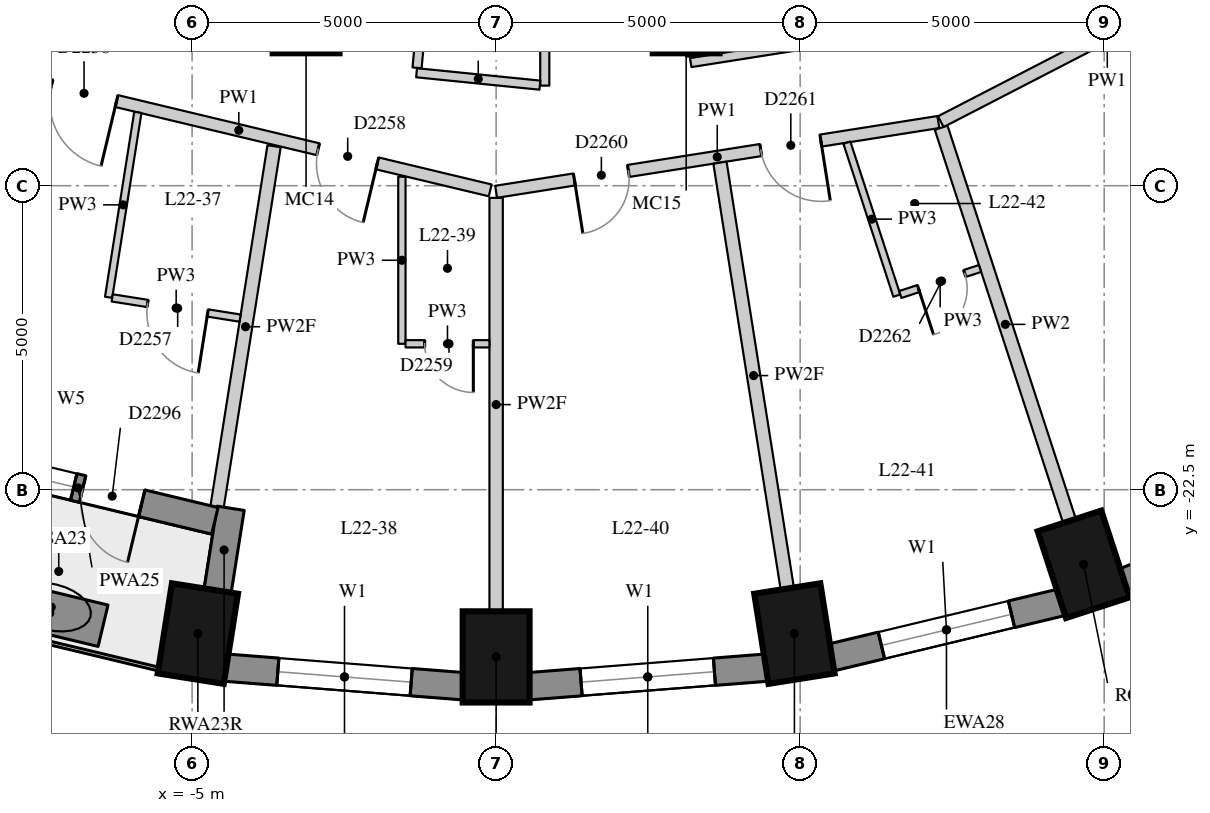
"""IFC4 building model, lengths in metres.
Left out: names, types, materials, properties, quantities, classifications, styles, units other than length and angle.
Written with IfcOpenShell. Run it as: python <this file> out.ifc"""

import sys

from ifc_helpers import new_model, si_unit, direction, frame, frame_2d, origin, origin_2d, place, context, subcontext, project, spatial, rectangle, extrude, element, fill, save


model = new_model("IFC4")
c1 = context("Model", 3, precision=1e-05, world=origin(), true_north=direction((0.0, 1.0)))
c2 = subcontext(c1, "Body", "Model", "MODEL_VIEW")
j1 = project(units=[si_unit("LENGTHUNIT", "METRE"), si_unit("PLANEANGLEUNIT", "RADIAN")], contexts=[c1])
p1 = place(None, origin())
s1 = spatial("IfcSite", under=j1, at=p1, CompositionType="ELEMENT")
p2 = place(p1, origin())
s2 = spatial("IfcBuilding", under=s1, at=p2, CompositionType="ELEMENT")
p3 = place(p2, frame((0.0, 0.0, 81.1)))
s3 = spatial("IfcBuildingStorey", under=s2, at=p3, CompositionType="ELEMENT", Elevation=81.1)
for number, where, z_axis, x_axis in (
    (1, (-4.906, -24.866, 0.0), (0.0, 0.0, 1.0), (-0.156, -0.988, 0.0)),
    (2, (0.0, -25.25, 0.0), (0.0, 0.0, 1.0), (0.0, -1.0, 0.0)),
    (3, (4.906, -24.866, 0.0), (0.0, 0.0, 1.0), (0.156, -0.988, 0.0)),
    (4, (9.662, -23.727, 0.0), (0.0, 0.0, 1.0), (0.31, -0.951, 0.0)),
):
    element("IfcColumn", number, at=place(p3, frame(where, z_axis=z_axis, x_axis=x_axis)), inside=s3, PredefinedType="COLUMN", context=c2, shape_type="SweptSolid", body=[
        extrude(rectangle(XDim=1.5, YDim=1.1, at=origin_2d()), origin(), (0.0, 0.0, 1.0), 3.3),
    ])
for number, where, z_axis, x_axis in (
    (5, (-3.126, -14.772, 0.0), (0.0, 0.0, 1.0), (1.0, 0.0, 0.0)),
    (6, (3.126, -14.772, 0.0), (0.0, 0.0, 1.0), (1.0, 0.0, 0.0)),
):
    element("IfcColumn", number, at=place(p3, frame(where, z_axis=z_axis, x_axis=x_axis)), inside=s3, PredefinedType="COLUMN", context=c2, shape_type="SweptSolid", body=[
        extrude(rectangle(XDim=1.1, YDim=1.1, at=origin_2d()), origin(), (0.0, 0.0, 1.0), 3.3),
    ])
p4 = place(p3, frame((-4.457, -25.426, 0.0), z_axis=(0.0, 0.0, 1.0), x_axis=(0.996955972145, -0.077966592873, 0.0)))
e7 = element("IfcWall", 7, at=p4, inside=s3, PredefinedType="SOLIDWALL", context=c2, shape_type="SweptSolid", body=[
    extrude(rectangle(XDim=3.939, YDim=0.45, at=frame_2d((1.97, 0.0))), origin(), (0.0, 0.0, 1.0), 2.85),
])
p5 = place(p4, frame((0.87, 0.0, 0.4)))
e8 = element("IfcOpeningElement", 8, at=p5, cuts=e7, PredefinedType="OPENING", context=c2, shape_type="SweptSolid", body=[
    extrude(rectangle(XDim=2.2, YDim=1.75, at=frame_2d((1.1, 0.875))), frame((0.0, 0.235, 0.0), z_axis=(0.0, -1.0, 0.0), x_axis=(1.0, 0.0, 0.0)), (0.0, 0.0, 1.0), 0.47),
])
p6 = place(p3, frame((0.53, -25.733, 0.0), z_axis=(0.0, 0.0, 1.0), x_axis=(0.996955972145, 0.077966592873, 0.0)))
e9 = element("IfcWall", 9, at=p6, inside=s3, PredefinedType="SOLIDWALL", context=c2, shape_type="SweptSolid", body=[
    extrude(rectangle(XDim=3.939, YDim=0.45, at=frame_2d((1.97, 0.0))), origin(), (0.0, 0.0, 1.0), 2.85),
])
p7 = place(p6, frame((0.87, 0.0, 0.4)))
e10 = element("IfcOpeningElement", 10, at=p7, cuts=e9, PredefinedType="OPENING", context=c2, shape_type="SweptSolid", body=[
    extrude(rectangle(XDim=2.2, YDim=1.75, at=frame_2d((1.1, 0.875))), frame((0.0, 0.235, 0.0), z_axis=(0.0, -1.0, 0.0), x_axis=(1.0, 0.0, 0.0)), (0.0, 0.0, 1.0), 0.47),
])
p8 = place(p3, frame((5.504, -25.26, 0.0), z_axis=(0.0, 0.0, 1.0), x_axis=(0.972496561493, 0.232917233979, 0.0)))
e11 = element("IfcWall", 11, at=p8, inside=s3, PredefinedType="SOLIDWALL", context=c2, shape_type="SweptSolid", body=[
    extrude(rectangle(XDim=3.911, YDim=0.45, at=frame_2d((1.956, 0.0))), origin(), (0.0, 0.0, 1.0), 2.85),
])
p9 = place(p8, frame((0.855, 0.0, 0.4)))
e12 = element("IfcOpeningElement", 12, at=p9, cuts=e11, PredefinedType="OPENING", context=c2, shape_type="SweptSolid", body=[
    extrude(rectangle(XDim=2.2, YDim=1.75, at=frame_2d((1.1, 0.875))), frame((0.0, 0.235, 0.0), z_axis=(0.0, -1.0, 0.0), x_axis=(1.0, 0.0, 0.0)), (0.0, 0.0, 1.0), 0.47),
])
p10 = place(p3, frame((10.315, -24.021, 0.0), z_axis=(0.0, 0.0, 1.0), x_axis=(0.923031964282, 0.384723267966, 0.0)))
e13 = element("IfcWall", 13, at=p10, inside=s3, PredefinedType="SOLIDWALL", context=c2, shape_type="SweptSolid", body=[
    extrude(rectangle(XDim=3.856, YDim=0.45, at=frame_2d((1.928, 0.0))), origin(), (0.0, 0.0, 1.0), 2.85),
])
p11 = place(p10, frame((0.828, 0.0, 0.4)))
e14 = element("IfcOpeningElement", 14, at=p11, cuts=e13, PredefinedType="OPENING", context=c2, shape_type="SweptSolid", body=[
    extrude(rectangle(XDim=2.2, YDim=1.75, at=frame_2d((1.1, 0.875))), frame((0.0, 0.235, 0.0), z_axis=(0.0, -1.0, 0.0), x_axis=(1.0, 0.0, 0.0)), (0.0, 0.0, 1.0), 0.47),
])
p12 = place(p3, frame((-4.583, -24.178, 0.0), z_axis=(0.0, 0.0, 1.0), x_axis=(0.156133927791, 0.98773589415, 0.0)))
e15 = element("IfcWall", 15, at=p12, inside=s3, PredefinedType="SOLIDWALL", context=c2, shape_type="SweptSolid", body=[
    extrude(rectangle(XDim=1.39, YDim=0.45, at=frame_2d((0.695, 0.0))), origin(), (0.0, 0.0, 1.0), 2.3),
])
p13 = place(p3, frame((-9.122, -21.932, 0.0), z_axis=(0.0, 0.0, 1.0), x_axis=(0.972346547441, -0.233542697764, 0.0)))
e16 = element("IfcWall", 16, at=p13, inside=s3, PredefinedType="SOLIDWALL", context=c2, shape_type="SweptSolid", body=[
    extrude(rectangle(XDim=4.624, YDim=0.45, at=frame_2d((2.312, 0.0))), origin(), (0.0, 0.0, 1.0), 2.85),
])
p14 = place(p13, frame((1.237, 0.0, 0.4)))
e17 = element("IfcOpeningElement", 17, at=p14, cuts=e16, PredefinedType="OPENING", context=c2, shape_type="SweptSolid", body=[
    extrude(rectangle(XDim=1.0, YDim=1.75, at=frame_2d((0.5, 0.875))), frame((0.0, 0.235, 0.0), z_axis=(0.0, -1.0, 0.0), x_axis=(1.0, 0.0, 0.0)), (0.0, 0.0, 1.0), 0.47),
])
p15 = place(p13, frame((2.387, 0.0, 0.0)))
e18 = element("IfcOpeningElement", 18, at=p15, cuts=e16, PredefinedType="OPENING", context=c2, shape_type="SweptSolid", body=[
    extrude(rectangle(XDim=1.0, YDim=2.15, at=frame_2d((0.5, 1.075))), frame((0.0, 0.235, 0.0), z_axis=(0.0, -1.0, 0.0), x_axis=(1.0, 0.0, 0.0)), (0.0, 0.0, 1.0), 0.47),
])
p16 = place(p3, frame((-8.215, -24.318, 0.0), z_axis=(0.0, 0.0, 1.0), x_axis=(0.972504142103, -0.232885580473, 0.0)))
e19 = element("IfcWall", 19, at=p16, inside=s3, PredefinedType="USERDEFINED", context=c2, shape_type="SweptSolid", body=[
    extrude(rectangle(XDim=1.8, YDim=0.7, at=frame_2d((0.9, 0.0))), origin(), (0.0, 0.0, 1.0), 0.75),
])
p17 = place(p3, frame((12.79, -13.619, 0.0), z_axis=(0.0, 0.0, 1.0), x_axis=(-0.888545137607, -0.458789209152, 0.0)))
e20 = element("IfcWall", 20, at=p17, inside=s3, PredefinedType="PARTITIONING", context=c2, shape_type="SweptSolid", body=[
    extrude(rectangle(XDim=6.164, YDim=0.2, at=frame_2d((3.082, 0.0))), origin(), (0.0, 0.0, 1.0), 2.85),
])
p18 = place(p17, frame((1.533, 0.0, 0.0)))
e21 = element("IfcOpeningElement", 21, at=p18, cuts=e20, PredefinedType="OPENING", context=c2, shape_type="SweptSolid", body=[
    extrude(rectangle(XDim=1.1, YDim=2.1, at=frame_2d((0.55, 1.05))), frame((0.0, 0.11, 0.0), z_axis=(0.0, -1.0, 0.0), x_axis=(1.0, 0.0, 0.0)), (0.0, 0.0, 1.0), 0.22),
])
p19 = place(p3, frame((7.273, -16.453, 0.0), z_axis=(0.0, 0.0, 1.0), x_axis=(-0.987787686426, -0.155805925901, 0.0)))
e22 = element("IfcWall", 22, at=p19, inside=s3, PredefinedType="PARTITIONING", context=c2, shape_type="SweptSolid", body=[
    extrude(rectangle(XDim=7.363, YDim=0.2, at=frame_2d((3.682, 0.0))), origin(), (0.0, 0.0, 1.0), 2.85),
])
p20 = place(p19, frame((5.161, 0.0, 0.0)))
e23 = element("IfcOpeningElement", 23, at=p20, cuts=e22, PredefinedType="OPENING", context=c2, shape_type="SweptSolid", body=[
    extrude(rectangle(XDim=0.9, YDim=2.1, at=frame_2d((0.45, 1.05))), frame((0.0, 0.11, 0.0), z_axis=(0.0, -1.0, 0.0), x_axis=(1.0, 0.0, 0.0)), (0.0, 0.0, 1.0), 0.22),
])
p21 = place(p19, frame((1.957, 0.0, 0.0)))
e24 = element("IfcOpeningElement", 24, at=p21, cuts=e22, PredefinedType="OPENING", context=c2, shape_type="SweptSolid", body=[
    extrude(rectangle(XDim=1.0, YDim=2.1, at=frame_2d((0.5, 1.05))), frame((0.0, 0.11, 0.0), z_axis=(0.0, -1.0, 0.0), x_axis=(1.0, 0.0, 0.0)), (0.0, 0.0, 1.0), 0.22),
])
p22 = place(p3, frame((-0.098, -17.577, 0.0), z_axis=(0.0, 0.0, 1.0), x_axis=(-0.972591034443, 0.232522428425, 0.0)))
e25 = element("IfcWall", 25, at=p22, inside=s3, PredefinedType="PARTITIONING", context=c2, shape_type="SweptSolid", body=[
    extrude(rectangle(XDim=8.501, YDim=0.2, at=frame_2d((4.251, 0.0))), origin(), (0.0, 0.0, 1.0), 2.85),
])
p23 = place(p22, frame((6.318, 0.0, 0.0)))
e26 = element("IfcOpeningElement", 26, at=p23, cuts=e25, PredefinedType="OPENING", context=c2, shape_type="SweptSolid", body=[
    extrude(rectangle(XDim=1.1, YDim=2.1, at=frame_2d((0.55, 1.05))), frame((0.0, 0.11, 0.0), z_axis=(0.0, -1.0, 0.0), x_axis=(1.0, 0.0, 0.0)), (0.0, 0.0, 1.0), 0.22),
])
p24 = place(p22, frame((1.909, 0.0, 0.0)))
e27 = element("IfcOpeningElement", 27, at=p24, cuts=e25, PredefinedType="OPENING", context=c2, shape_type="SweptSolid", body=[
    extrude(rectangle(XDim=1.0, YDim=2.1, at=frame_2d((0.5, 1.05))), frame((0.0, 0.11, 0.0), z_axis=(0.0, -1.0, 0.0), x_axis=(1.0, 0.0, 0.0)), (0.0, 0.0, 1.0), 0.22),
])
p25 = place(p3, frame((0.8, -9.15, 0.0), z_axis=(0.0, 0.0, 1.0), x_axis=(0.0, -1.0, 0.0)))
e28 = element("IfcWall", 28, at=p25, inside=s3, PredefinedType="PARTITIONING", context=c2, shape_type="SweptSolid", body=[
    extrude(rectangle(XDim=6.704, YDim=0.15, at=frame_2d((3.352, 0.0))), origin(), (0.0, 0.0, 1.0), 2.3),
])
p26 = place(p25, frame((2.902, 0.0, 0.0)))
e29 = element("IfcOpeningElement", 29, at=p26, cuts=e28, PredefinedType="OPENING", context=c2, shape_type="SweptSolid", body=[
    extrude(rectangle(XDim=0.9, YDim=2.1, at=frame_2d((0.45, 1.05))), frame((0.0, 0.085, 0.0), z_axis=(0.0, -1.0, 0.0), x_axis=(1.0, 0.0, 0.0)), (0.0, 0.0, 1.0), 0.17),
])
p27 = place(p3, frame((0.72, -15.846, 0.0), z_axis=(0.0, 0.0, 1.0), x_axis=(-0.994975339981, 0.100120291794, 0.0)))
e30 = element("IfcWall", 30, at=p27, inside=s3, PredefinedType="PARTITIONING", context=c2, shape_type="SweptSolid", body=[
    extrude(rectangle(XDim=2.039, YDim=0.15, at=frame_2d((1.019, 0.0))), origin(), (0.0, 0.0, 1.0), 2.85),
])
p28 = place(p3, frame((-1.301, -15.562, 0.0), z_axis=(0.0, 0.0, 1.0), x_axis=(0.092711214224, 0.995693040428, 0.0)))
e31 = element("IfcWall", 31, at=p28, inside=s3, PredefinedType="PARTITIONING", context=c2, shape_type="SweptSolid", body=[
    extrude(rectangle(XDim=1.346, YDim=0.15, at=frame_2d((0.673, 0.0))), origin(), (0.0, 0.0, 1.0), 2.3),
])
p29 = place(p3, frame((6.788, -14.909, 0.0), z_axis=(0.0, 0.0, 1.0), x_axis=(-0.987791284458, -0.15578311317, 0.0)))
e32 = element("IfcWall", 32, at=p29, inside=s3, PredefinedType="PARTITIONING", context=c2, shape_type="SweptSolid", body=[
    extrude(rectangle(XDim=3.633, YDim=0.15, at=frame_2d((1.816, 0.0))), origin(), (0.0, 0.0, 1.0), 2.85),
])
p30 = place(p3, frame((3.2, -15.375, 0.0), z_axis=(0.0, 0.0, 1.0), x_axis=(0.0, 1.0, 0.0)))
e33 = element("IfcWall", 33, at=p30, inside=s3, PredefinedType="PARTITIONING", context=c2, shape_type="SweptSolid", body=[
    extrude(rectangle(XDim=3.375, YDim=0.15, at=frame_2d((1.688, 0.0))), origin(), (0.0, 0.0, 1.0), 2.85),
])
p31 = place(p3, frame((-4.591, -22.789, 0.0), z_axis=(0.0, 0.0, 1.0), x_axis=(0.156141909376, 0.987734632448, 0.0)))
e34 = element("IfcWall", 34, at=p31, inside=s3, PredefinedType="PARTITIONING", context=c2, shape_type="SweptSolid", body=[
    extrude(rectangle(XDim=6.012, YDim=0.22, at=frame_2d((3.006, 0.0))), origin(), (0.0, 0.0, 1.0), 2.3),
])
p32 = place(p3, frame((0.0, -24.5, 0.0), z_axis=(0.0, 0.0, 1.0), x_axis=(0.0, 1.0, 0.0)))
e35 = element("IfcWall", 35, at=p32, inside=s3, PredefinedType="PARTITIONING", context=c2, shape_type="SweptSolid", body=[
    extrude(rectangle(XDim=6.8, YDim=0.22, at=frame_2d((3.4, 0.0))), origin(), (0.0, 0.0, 1.0), 2.3),
])
p33 = place(p3, frame((4.788, -24.125, 0.0), z_axis=(0.0, 0.0, 1.0), x_axis=(-0.156119905599, 0.987738110572, 0.0)))
e36 = element("IfcWall", 36, at=p33, inside=s3, PredefinedType="PARTITIONING", context=c2, shape_type="SweptSolid", body=[
    extrude(rectangle(XDim=7.092, YDim=0.22, at=frame_2d((3.546, 0.0))), origin(), (0.0, 0.0, 1.0), 2.3),
])
p34 = place(p3, frame((9.429, -23.014, 0.0), z_axis=(0.0, 0.0, 1.0), x_axis=(-0.310213813997, 0.95066681314, 0.0)))
e37 = element("IfcWall", 37, at=p34, inside=s3, PredefinedType="PARTITIONING", context=c2, shape_type="SweptSolid", body=[
    extrude(rectangle(XDim=6.803, YDim=0.22, at=frame_2d((3.401, 0.0))), origin(), (0.0, 0.0, 1.0), 2.85),
])
p35 = place(p3, frame((-5.892, -16.294, 0.0), z_axis=(0.0, 0.0, 1.0), x_axis=(-0.156190565974, -0.987726939544, 0.0)))
e38 = element("IfcWall", 38, at=p35, inside=s3, PredefinedType="PARTITIONING", context=c2, shape_type="SweptSolid", body=[
    extrude(rectangle(XDim=3.079, YDim=0.12, at=frame_2d((1.54, 0.0))), origin(), (0.0, 0.0, 1.0), 2.85),
])
p36 = place(p3, frame((-1.55, -17.352, 0.0), z_axis=(0.0, 0.0, 1.0), x_axis=(0.0, -1.0, 0.0)))
e39 = element("IfcWall", 39, at=p36, inside=s3, PredefinedType="PARTITIONING", context=c2, shape_type="SweptSolid", body=[
    extrude(rectangle(XDim=2.748, YDim=0.12, at=frame_2d((1.374, 0.0))), origin(), (0.0, 0.0, 1.0), 2.85),
])
p37 = place(p3, frame((5.768, -16.792, 0.0), z_axis=(0.0, 0.0, 1.0), x_axis=(0.310272506556, -0.950647659059, 0.0)))
e40 = element("IfcWall", 40, at=p37, inside=s3, PredefinedType="PARTITIONING", context=c2, shape_type="SweptSolid", body=[
    extrude(rectangle(XDim=2.647, YDim=0.12, at=frame_2d((1.323, 0.0))), origin(), (0.0, 0.0, 1.0), 2.85),
])
p38 = place(p3, frame((-6.314, -19.345, 0.0), z_axis=(0.0, 0.0, 1.0), x_axis=(0.987720176341, -0.156233329506, 0.0)))
e41 = element("IfcWall", 41, at=p38, inside=s3, PredefinedType="PARTITIONING", context=c2, shape_type="SweptSolid", body=[
    extrude(rectangle(XDim=2.13, YDim=0.12, at=frame_2d((1.065, 0.0))), origin(), (0.0, 0.0, 1.0), 2.85),
])
p39 = place(p38, frame((0.59, 0.0, 0.0)))
e42 = element("IfcOpeningElement", 42, at=p39, cuts=e41, PredefinedType="OPENING", context=c2, shape_type="SweptSolid", body=[
    extrude(rectangle(XDim=1.0, YDim=2.1, at=frame_2d((0.5, 1.05))), frame((0.0, 0.07, 0.0), z_axis=(0.0, -1.0, 0.0), x_axis=(1.0, 0.0, 0.0)), (0.0, 0.0, 1.0), 0.14),
])
p40 = place(p3, frame((-1.49, -20.1, 0.0), z_axis=(0.0, 0.0, 1.0), x_axis=(1.0, 0.0, 0.0)))
e43 = element("IfcWall", 43, at=p40, inside=s3, PredefinedType="PARTITIONING", context=c2, shape_type="SweptSolid", body=[
    extrude(rectangle(XDim=1.38, YDim=0.12, at=frame_2d((0.69, 0.0))), origin(), (0.0, 0.0, 1.0), 2.85),
])
p41 = place(p40, frame((0.315, 0.0, 0.0)))
e44 = element("IfcOpeningElement", 44, at=p41, cuts=e43, PredefinedType="OPENING", context=c2, shape_type="SweptSolid", body=[
    extrude(rectangle(XDim=0.8, YDim=2.1, at=frame_2d((0.4, 1.05))), frame((0.0, 0.07, 0.0), z_axis=(0.0, -1.0, 0.0), x_axis=(1.0, 0.0, 0.0)), (0.0, 0.0, 1.0), 0.14),
])
p42 = place(p3, frame((6.647, -19.29, 0.0), z_axis=(0.0, 0.0, 1.0), x_axis=(0.950628893115, 0.310329997864, 0.0)))
e45 = element("IfcWall", 45, at=p42, inside=s3, PredefinedType="PARTITIONING", context=c2, shape_type="SweptSolid", body=[
    extrude(rectangle(XDim=1.38, YDim=0.12, at=frame_2d((0.69, 0.0))), origin(), (0.0, 0.0, 1.0), 2.85),
])
p43 = place(p42, frame((0.315, 0.0, 0.0)))
e46 = element("IfcOpeningElement", 46, at=p43, cuts=e45, PredefinedType="OPENING", context=c2, shape_type="SweptSolid", body=[
    extrude(rectangle(XDim=0.8, YDim=2.1, at=frame_2d((0.4, 1.05))), frame((0.0, 0.07, 0.0), z_axis=(0.0, -1.0, 0.0), x_axis=(1.0, 0.0, 0.0)), (0.0, 0.0, 1.0), 0.14),
])
p44 = place(p5, origin())
e47 = element("IfcWindow", 47, at=p44, inside=s3, PartitioningType="SINGLE_PANEL", PredefinedType="WINDOW", context=c2, shape_type="SweptSolid", body=[
    extrude(rectangle(XDim=2.2, YDim=1.75, at=frame_2d((1.1, 0.875))), frame((0.0, 0.035, 0.0), z_axis=(0.0, -1.0, 0.0), x_axis=(1.0, 0.0, 0.0)), (0.0, 0.0, 1.0), 0.06),
])
fill(e8, e47)
p45 = place(p7, origin())
e48 = element("IfcWindow", 48, at=p45, inside=s3, PartitioningType="SINGLE_PANEL", PredefinedType="WINDOW", context=c2, shape_type="SweptSolid", body=[
    extrude(rectangle(XDim=2.2, YDim=1.75, at=frame_2d((1.1, 0.875))), frame((0.0, 0.035, 0.0), z_axis=(0.0, -1.0, 0.0), x_axis=(1.0, 0.0, 0.0)), (0.0, 0.0, 1.0), 0.06),
])
fill(e10, e48)
p46 = place(p9, origin())
e49 = element("IfcWindow", 49, at=p46, inside=s3, PartitioningType="SINGLE_PANEL", PredefinedType="WINDOW", context=c2, shape_type="SweptSolid", body=[
    extrude(rectangle(XDim=2.2, YDim=1.75, at=frame_2d((1.1, 0.875))), frame((0.0, 0.035, 0.0), z_axis=(0.0, -1.0, 0.0), x_axis=(1.0, 0.0, 0.0)), (0.0, 0.0, 1.0), 0.06),
])
fill(e12, e49)
p47 = place(p14, origin())
e50 = element("IfcWindow", 50, at=p47, inside=s3, PartitioningType="SINGLE_PANEL", PredefinedType="WINDOW", context=c2, shape_type="SweptSolid", body=[
    extrude(rectangle(XDim=1.0, YDim=1.75, at=frame_2d((0.5, 0.875))), frame((0.0, 0.035, 0.0), z_axis=(0.0, -1.0, 0.0), x_axis=(1.0, 0.0, 0.0)), (0.0, 0.0, 1.0), 0.06),
])
fill(e17, e50)
p48 = place(p15, frame((1.0, 0.0, 0.0), z_axis=(0.0, 0.0, 1.0), x_axis=(-1.0, 0.0, 0.0)))
e51 = element("IfcDoor", 51, at=p48, inside=s3, OperationType="SINGLE_SWING_LEFT", PredefinedType="DOOR", context=c2, shape_type="SweptSolid", body=[
    extrude(rectangle(XDim=1.0, YDim=2.15, at=frame_2d((0.5, 1.075))), frame((0.0, 0.075, 0.0), z_axis=(0.0, -1.0, 0.0), x_axis=(1.0, 0.0, 0.0)), (0.0, 0.0, 1.0), 0.05),
])
fill(e18, e51)
p49 = place(p23, origin())
e52 = element("IfcDoor", 52, at=p49, inside=s3, OperationType="SINGLE_SWING_LEFT", PredefinedType="DOOR", context=c2, shape_type="SweptSolid", body=[
    extrude(rectangle(XDim=1.1, YDim=2.1, at=frame_2d((0.55, 1.05))), frame((0.0, 0.025, 0.0), z_axis=(0.0, -1.0, 0.0), x_axis=(1.0, 0.0, 0.0)), (0.0, 0.0, 1.0), 0.05),
])
fill(e26, e52)
p50 = place(p39, origin())
e53 = element("IfcDoor", 53, at=p50, inside=s3, OperationType="SINGLE_SWING_LEFT", PredefinedType="DOOR", context=c2, shape_type="SweptSolid", body=[
    extrude(rectangle(XDim=1.0, YDim=2.1, at=frame_2d((0.5, 1.05))), frame((0.0, 0.025, 0.0), z_axis=(0.0, -1.0, 0.0), x_axis=(1.0, 0.0, 0.0)), (0.0, 0.0, 1.0), 0.05),
])
fill(e42, e53)
p51 = place(p24, origin())
e54 = element("IfcDoor", 54, at=p51, inside=s3, OperationType="SINGLE_SWING_LEFT", PredefinedType="DOOR", context=c2, shape_type="SweptSolid", body=[
    extrude(rectangle(XDim=1.0, YDim=2.1, at=frame_2d((0.5, 1.05))), frame((0.0, 0.025, 0.0), z_axis=(0.0, -1.0, 0.0), x_axis=(1.0, 0.0, 0.0)), (0.0, 0.0, 1.0), 0.05),
])
fill(e27, e54)
p52 = place(p41, origin())
e55 = element("IfcDoor", 55, at=p52, inside=s3, OperationType="SINGLE_SWING_LEFT", PredefinedType="DOOR", context=c2, shape_type="SweptSolid", body=[
    extrude(rectangle(XDim=0.8, YDim=2.1, at=frame_2d((0.4, 1.05))), frame((0.0, 0.025, 0.0), z_axis=(0.0, -1.0, 0.0), x_axis=(1.0, 0.0, 0.0)), (0.0, 0.0, 1.0), 0.05),
])
fill(e44, e55)
p53 = place(p20, origin())
e56 = element("IfcDoor", 56, at=p53, inside=s3, OperationType="SINGLE_SWING_RIGHT", PredefinedType="DOOR", context=c2, shape_type="SweptSolid", body=[
    extrude(rectangle(XDim=0.9, YDim=2.1, at=frame_2d((0.45, 1.05))), frame((0.0, 0.025, 0.0), z_axis=(0.0, -1.0, 0.0), x_axis=(1.0, 0.0, 0.0)), (0.0, 0.0, 1.0), 0.05),
])
fill(e23, e56)
p54 = place(p21, origin())
e57 = element("IfcDoor", 57, at=p54, inside=s3, OperationType="SINGLE_SWING_LEFT", PredefinedType="DOOR", context=c2, shape_type="SweptSolid", body=[
    extrude(rectangle(XDim=1.0, YDim=2.1, at=frame_2d((0.5, 1.05))), frame((0.0, 0.025, 0.0), z_axis=(0.0, -1.0, 0.0), x_axis=(1.0, 0.0, 0.0)), (0.0, 0.0, 1.0), 0.05),
])
fill(e24, e57)
p55 = place(p43, origin())
e58 = element("IfcDoor", 58, at=p55, inside=s3, OperationType="SINGLE_SWING_RIGHT", PredefinedType="DOOR", context=c2, shape_type="SweptSolid", body=[
    extrude(rectangle(XDim=0.8, YDim=2.1, at=frame_2d((0.4, 1.05))), frame((0.0, 0.025, 0.0), z_axis=(0.0, -1.0, 0.0), x_axis=(1.0, 0.0, 0.0)), (0.0, 0.0, 1.0), 0.05),
])
fill(e46, e58)
save(model, sys.argv[1])
